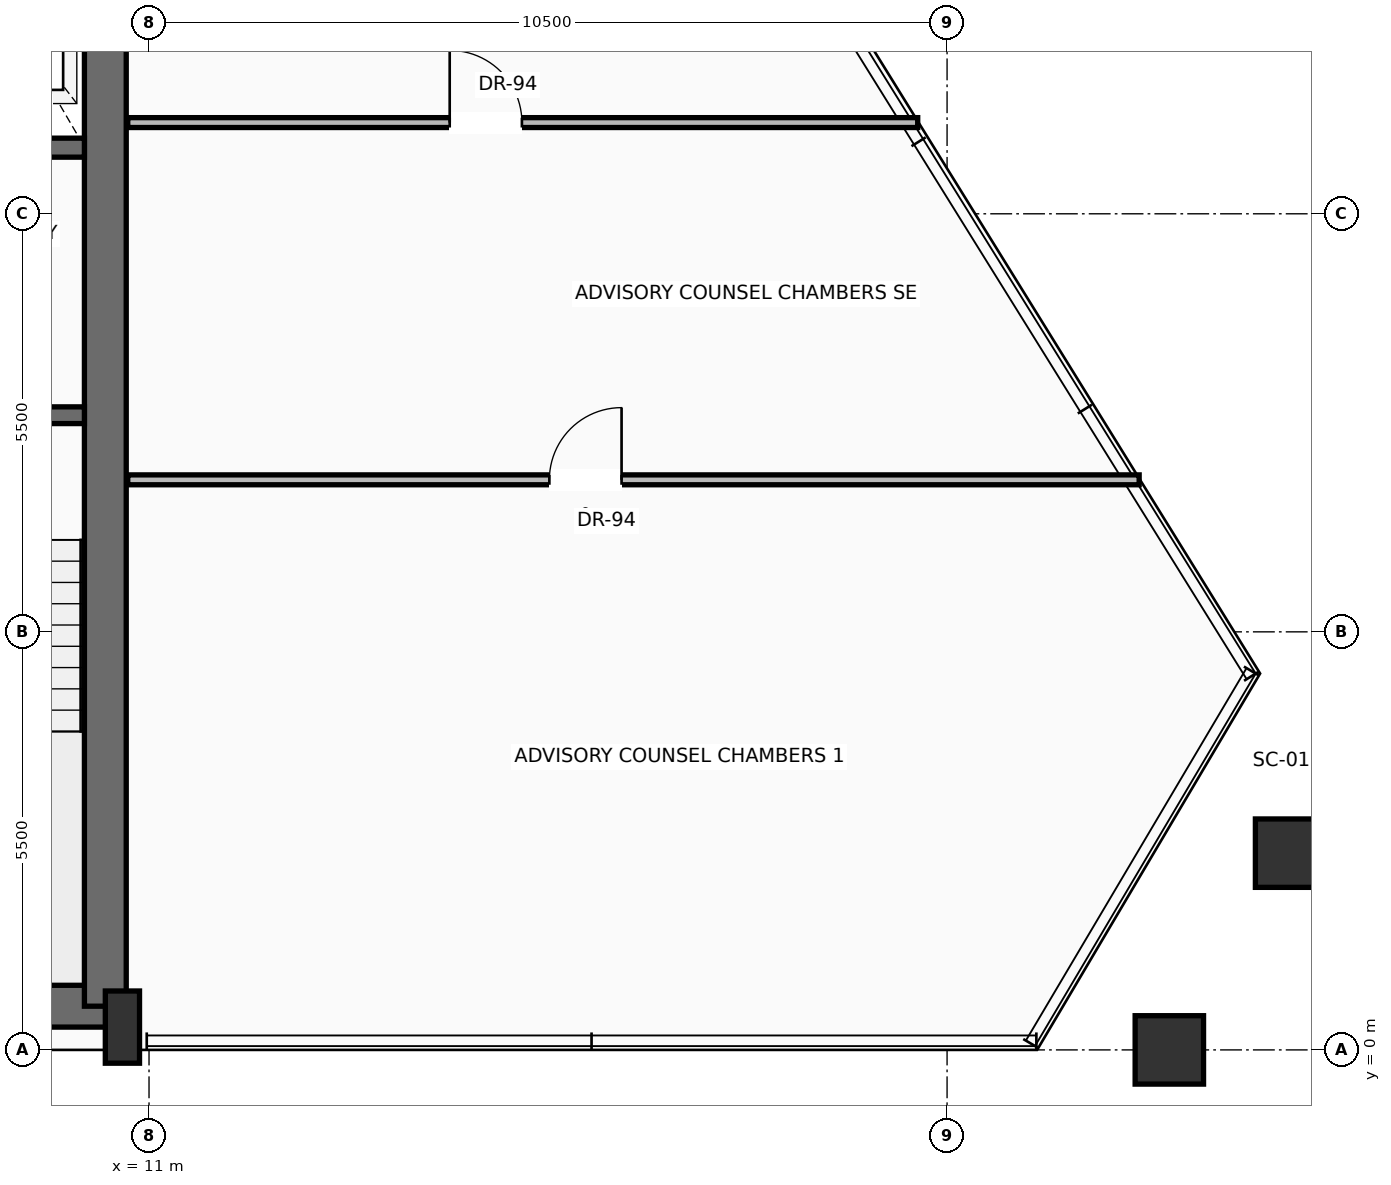
"""IFC4 building model, lengths in metres.
Left out: names, types, materials, properties, quantities, classifications, styles, units other than length and angle.
Written with IfcOpenShell. Run it as: python <this file> out.ifc"""

import sys

from ifc_helpers import new_model, si_unit, direction, frame, frame_2d, origin, origin_2d, place, context, subcontext, project, spatial, rectangle, hollow_rectangle, extrude, source, transform, mapped, element, fill, save


model = new_model("IFC4")
c1 = context("Model", 3, precision=1e-05, world=origin(), true_north=direction((0.0, 1.0)))
c2 = subcontext(c1, "Body", "Model", "MODEL_VIEW")
j1 = project(units=[si_unit("LENGTHUNIT", "METRE"), si_unit("PLANEANGLEUNIT", "RADIAN")], contexts=[c1])
p1 = place(None, origin())
s1 = spatial("IfcSite", under=j1, at=p1, CompositionType="ELEMENT")
p2 = place(p1, origin())
s2 = spatial("IfcBuilding", under=s1, at=p2, CompositionType="ELEMENT")
p3 = place(p2, frame((0.0, 0.0, 233.8)))
s3 = spatial("IfcBuildingStorey", under=s2, at=p3, CompositionType="ELEMENT", Elevation=233.8)
p4 = place(p3, frame((-10.65, 0.575, 0.0), z_axis=(0.0, 0.0, 1.0), x_axis=(1.0, 0.0, 0.0)))
e1 = element("IfcWall", 1, at=p4, inside=s3, PredefinedType="SHEAR", context=c2, shape_type="SweptSolid", body=[
    extrude(rectangle(XDim=21.3, YDim=0.55, at=frame_2d((10.65, 0.0))), origin(), (0.0, 0.0, 1.0), 3.24),
])
p5 = place(p3, frame((10.425, 0.575, 0.0), z_axis=(0.0, 0.0, 1.0), x_axis=(0.0, 1.0, 0.0)))
e2 = element("IfcWall", 2, at=p5, inside=s3, PredefinedType="SHEAR", context=c2, shape_type="SweptSolid", body=[
    extrude(rectangle(XDim=15.45, YDim=0.55, at=frame_2d((7.725, 0.0))), origin(), (0.0, 0.0, 1.0), 3.24),
])
m1 = source(origin(), c2, "Body", "SweptSolid", [
    extrude(rectangle(XDim=0.45, YDim=0.95, at=origin_2d()), origin(), (0.0, 0.0, 1.0), 3.45),
])
p6 = place(p3, frame((10.65, 0.3, 0.0), z_axis=(0.0, 0.0, 1.0), x_axis=(1.0, 0.0, 0.0)))
e3 = element("IfcColumn", 3, at=p6, inside=s3, PredefinedType="PILASTER", context=c2, shape_type="MappedRepresentation", body=[
    mapped(m1, transform((0.0, 0.0, 0.0), scale=1.0)),
])
m2 = source(origin(), c2, "Body", "SweptSolid", [
    extrude(hollow_rectangle(XDim=0.9, YDim=0.9, WallThickness=0.045, at=origin_2d()), origin(), (0.0, 0.0, 1.0), 3.441),
])
p7 = place(p3, frame((24.424, 0.0, 0.004), z_axis=(0.00177367582, 0.0, 0.999998427036), x_axis=(0.0, 1.0, 0.0)))
e4 = element("IfcColumn", 4, at=p7, inside=s3, PredefinedType="COLUMN", context=c2, shape_type="MappedRepresentation", body=[
    mapped(m2, transform((0.0, 0.0, 0.0), scale=1.0)),
])
m3 = source(origin(), c2, "Body", "SweptSolid", [
    extrude(hollow_rectangle(XDim=0.9, YDim=0.9, WallThickness=0.045, at=origin_2d()), origin(), (0.0, 0.0, 1.0), 3.442),
])
p8 = place(p3, frame((26.007, 2.588, 0.004), z_axis=(-0.009505189246, -0.016527679809, 0.999818227068), x_axis=(0.866866107438, -0.498541023162, 0.0)))
e5 = element("IfcColumn", 5, at=p8, inside=s3, PredefinedType="COLUMN", context=c2, shape_type="MappedRepresentation", body=[
    mapped(m3, transform((0.0, 0.0, 0.0), scale=1.0)),
])
p9 = place(p3, frame((10.15, 8.35, 0.0), z_axis=(0.0, 0.0, 1.0), x_axis=(-1.0, 0.0, 0.0)))
e6 = element("IfcWall", 6, at=p9, inside=s3, PredefinedType="SOLIDWALL", context=c2, shape_type="SweptSolid", body=[
    extrude(rectangle(XDim=4.65, YDim=0.22, at=frame_2d((2.325, 0.0))), origin(), (0.0, 0.0, 1.0), 3.24),
])
p10 = place(p9, frame((1.0, 0.0, 0.0)))
e7 = element("IfcOpeningElement", 7, at=p10, cuts=e6, PredefinedType="OPENING", context=c2, shape_type="SweptSolid", body=[
    extrude(rectangle(XDim=1.15, YDim=2.2, at=frame_2d((0.575, 1.1))), frame((0.0, 0.12, 0.0), z_axis=(0.0, -1.0, 0.0), x_axis=(1.0, 0.0, 0.0)), (0.0, 0.0, 1.0), 0.24),
])
p11 = place(p3, frame((10.15, 11.87, 0.0), z_axis=(0.0, 0.0, 1.0), x_axis=(-1.0, 0.0, 0.0)))
e8 = element("IfcWall", 8, at=p11, inside=s3, PredefinedType="SOLIDWALL", context=c2, shape_type="SweptSolid", body=[
    extrude(rectangle(XDim=4.65, YDim=0.25, at=frame_2d((2.325, 0.0))), origin(), (0.0, 0.0, 1.0), 3.24),
])
p12 = place(p11, frame((0.5, 0.0, 0.0)))
e9 = element("IfcOpeningElement", 9, at=p12, cuts=e8, PredefinedType="OPENING", context=c2, shape_type="SweptSolid", body=[
    extrude(rectangle(XDim=1.2, YDim=2.25, at=frame_2d((0.6, 1.125))), frame((0.0, 0.135, 0.0), z_axis=(0.0, -1.0, 0.0), x_axis=(1.0, 0.0, 0.0)), (0.0, 0.0, 1.0), 0.27),
])
p13 = place(p3, frame((10.72, 7.5, 0.0), z_axis=(0.0, 0.0, 1.0), x_axis=(1.0, 0.0, 0.0)))
e10 = element("IfcWall", 10, at=p13, inside=s3, PredefinedType="PARTITIONING", context=c2, shape_type="SweptSolid", body=[
    extrude(rectangle(XDim=13.307, YDim=0.13, at=frame_2d((6.654, 0.0))), origin(), (0.0, 0.0, 1.0), 3.232),
])
p14 = place(p13, frame((5.547, 0.0, 0.0)))
e11 = element("IfcOpeningElement", 11, at=p14, cuts=e10, PredefinedType="OPENING", context=c2, shape_type="SweptSolid", body=[
    extrude(rectangle(XDim=0.95, YDim=2.2, at=frame_2d((0.475, 1.1))), frame((0.0, 0.075, 0.0), z_axis=(0.0, -1.0, 0.0), x_axis=(1.0, 0.0, 0.0)), (0.0, 0.0, 1.0), 0.15),
])
p15 = place(p3, frame((10.72, 12.2, 0.0), z_axis=(0.0, 0.0, 1.0), x_axis=(1.0, 0.0, 0.0)))
e12 = element("IfcWall", 12, at=p15, inside=s3, PredefinedType="PARTITIONING", context=c2, shape_type="SweptSolid", body=[
    extrude(rectangle(XDim=10.394, YDim=0.13, at=frame_2d((5.197, 0.0))), origin(), (0.0, 0.0, 1.0), 3.232),
])
p16 = place(p15, frame((4.236, 0.0, 0.0)))
e13 = element("IfcOpeningElement", 13, at=p16, cuts=e12, PredefinedType="OPENING", context=c2, shape_type="SweptSolid", body=[
    extrude(rectangle(XDim=0.95, YDim=2.2, at=frame_2d((0.475, 1.1))), frame((0.0, 0.075, 0.0), z_axis=(0.0, -1.0, 0.0), x_axis=(1.0, 0.0, 0.0)), (0.0, 0.0, 1.0), 0.15),
])
m4 = source(origin(), c2, "Body", "SweptSolid", [
    extrude(rectangle(XDim=0.95, YDim=2.2, at=frame_2d((0.475, 1.1))), frame((0.0, 0.025, 0.0), z_axis=(0.0, -1.0, 0.0), x_axis=(1.0, 0.0, 0.0)), (0.0, 0.0, 1.0), 0.05),
])
p17 = place(p14, origin())
e14 = element("IfcDoor", 14, at=p17, inside=s3, OperationType="SINGLE_SWING_RIGHT", PredefinedType="DOOR", context=c2, shape_type="MappedRepresentation", body=[
    mapped(m4, transform((0.0, 0.0, 0.0), scale=1.0)),
])
fill(e11, e14)
p18 = place(p16, origin())
e15 = element("IfcDoor", 15, at=p18, inside=s3, OperationType="SINGLE_SWING_LEFT", PredefinedType="DOOR", context=c2, shape_type="MappedRepresentation", body=[
    mapped(m4, transform((0.0, 0.0, 0.0), scale=1.0)),
])
fill(e13, e15)
save(model, sys.argv[1])
